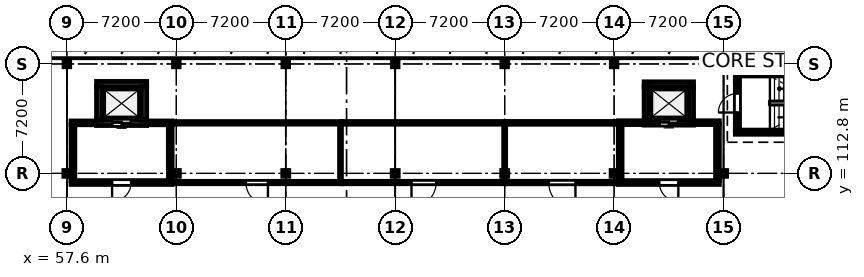
"""IFC4 building model, lengths in metres.
Left out: names, types, materials, properties, quantities, classifications, styles, units other than length and angle.
Written with IfcOpenShell. Run it as: python <this file> out.ifc"""

import sys

from ifc_helpers import new_model, si_unit, direction, frame, frame_2d, origin, origin_2d, place, context, subcontext, project, spatial, rectangle, i_section, extrude, element, fill, save


model = new_model("IFC4")
c1 = context("Model", 3, precision=1e-05, world=origin(), true_north=direction((0.0, 1.0)))
c2 = subcontext(c1, "Body", "Model", "MODEL_VIEW")
j1 = project(units=[si_unit("LENGTHUNIT", "METRE"), si_unit("PLANEANGLEUNIT", "RADIAN")], contexts=[c1])
p1 = place(None, origin())
s1 = spatial("IfcSite", under=j1, at=p1, CompositionType="ELEMENT")
p2 = place(p1, origin())
s2 = spatial("IfcBuilding", under=s1, at=p2, CompositionType="ELEMENT")
p3 = place(p2, frame((0.0, 0.0, 9.3)))
s3 = spatial("IfcBuildingStorey", under=s2, at=p3, CompositionType="ELEMENT", Elevation=9.3)
p4 = place(p3, frame((57.6, 112.8, 0.0), z_axis=(0.0, 0.0, 1.0), x_axis=(1.0, 0.0, 0.0)))
e1 = element("IfcColumn", 1, at=p4, inside=s3, PredefinedType="COLUMN", context=c2, shape_type="SweptSolid", body=[
    extrude(i_section(OverallWidth=0.396, OverallDepth=0.381, WebThickness=0.019, FlangeThickness=0.03, FilletRadius=0.015, at=origin_2d()), origin(), (0.0, 0.0, 1.0), 3.9),
])
p5 = place(p3, frame((57.6, 120.0, 0.0), z_axis=(0.0, 0.0, 1.0), x_axis=(1.0, 0.0, 0.0)))
e2 = element("IfcColumn", 2, at=p5, inside=s3, PredefinedType="COLUMN", context=c2, shape_type="SweptSolid", body=[
    extrude(i_section(OverallWidth=0.373, OverallDepth=0.373, WebThickness=0.016, FlangeThickness=0.026, FilletRadius=0.015, at=origin_2d()), origin(), (0.0, 0.0, 1.0), 3.9),
])
p6 = place(p3, frame((64.8, 112.8, 0.0), z_axis=(0.0, 0.0, 1.0), x_axis=(1.0, 0.0, 0.0)))
e3 = element("IfcColumn", 3, at=p6, inside=s3, PredefinedType="COLUMN", context=c2, shape_type="SweptSolid", body=[
    extrude(i_section(OverallWidth=0.396, OverallDepth=0.381, WebThickness=0.019, FlangeThickness=0.03, FilletRadius=0.015, at=origin_2d()), origin(), (0.0, 0.0, 1.0), 3.9),
])
p7 = place(p3, frame((64.8, 120.0, 0.0), z_axis=(0.0, 0.0, 1.0), x_axis=(1.0, 0.0, 0.0)))
e4 = element("IfcColumn", 4, at=p7, inside=s3, PredefinedType="COLUMN", context=c2, shape_type="SweptSolid", body=[
    extrude(i_section(OverallWidth=0.373, OverallDepth=0.373, WebThickness=0.016, FlangeThickness=0.026, FilletRadius=0.015, at=origin_2d()), origin(), (0.0, 0.0, 1.0), 3.9),
])
p8 = place(p3, frame((72.0, 112.8, 0.0), z_axis=(0.0, 0.0, 1.0), x_axis=(1.0, 0.0, 0.0)))
e5 = element("IfcColumn", 5, at=p8, inside=s3, PredefinedType="COLUMN", context=c2, shape_type="SweptSolid", body=[
    extrude(i_section(OverallWidth=0.396, OverallDepth=0.381, WebThickness=0.019, FlangeThickness=0.03, FilletRadius=0.015, at=origin_2d()), origin(), (0.0, 0.0, 1.0), 3.9),
])
p9 = place(p3, frame((72.0, 120.0, 0.0), z_axis=(0.0, 0.0, 1.0), x_axis=(1.0, 0.0, 0.0)))
e6 = element("IfcColumn", 6, at=p9, inside=s3, PredefinedType="COLUMN", context=c2, shape_type="SweptSolid", body=[
    extrude(i_section(OverallWidth=0.373, OverallDepth=0.373, WebThickness=0.016, FlangeThickness=0.026, FilletRadius=0.015, at=origin_2d()), origin(), (0.0, 0.0, 1.0), 3.9),
])
p10 = place(p3, frame((79.2, 112.8, 0.0), z_axis=(0.0, 0.0, 1.0), x_axis=(1.0, 0.0, 0.0)))
e7 = element("IfcColumn", 7, at=p10, inside=s3, PredefinedType="COLUMN", context=c2, shape_type="SweptSolid", body=[
    extrude(i_section(OverallWidth=0.396, OverallDepth=0.381, WebThickness=0.019, FlangeThickness=0.03, FilletRadius=0.015, at=origin_2d()), origin(), (0.0, 0.0, 1.0), 3.9),
])
p11 = place(p3, frame((79.2, 120.0, 0.0), z_axis=(0.0, 0.0, 1.0), x_axis=(1.0, 0.0, 0.0)))
e8 = element("IfcColumn", 8, at=p11, inside=s3, PredefinedType="COLUMN", context=c2, shape_type="SweptSolid", body=[
    extrude(i_section(OverallWidth=0.373, OverallDepth=0.373, WebThickness=0.016, FlangeThickness=0.026, FilletRadius=0.015, at=origin_2d()), origin(), (0.0, 0.0, 1.0), 3.9),
])
p12 = place(p3, frame((86.4, 112.8, 0.0), z_axis=(0.0, 0.0, 1.0), x_axis=(1.0, 0.0, 0.0)))
e9 = element("IfcColumn", 9, at=p12, inside=s3, PredefinedType="COLUMN", context=c2, shape_type="SweptSolid", body=[
    extrude(i_section(OverallWidth=0.396, OverallDepth=0.381, WebThickness=0.019, FlangeThickness=0.03, FilletRadius=0.015, at=origin_2d()), origin(), (0.0, 0.0, 1.0), 3.9),
])
p13 = place(p3, frame((86.4, 120.0, 0.0), z_axis=(0.0, 0.0, 1.0), x_axis=(1.0, 0.0, 0.0)))
e10 = element("IfcColumn", 10, at=p13, inside=s3, PredefinedType="COLUMN", context=c2, shape_type="SweptSolid", body=[
    extrude(i_section(OverallWidth=0.373, OverallDepth=0.373, WebThickness=0.016, FlangeThickness=0.026, FilletRadius=0.015, at=origin_2d()), origin(), (0.0, 0.0, 1.0), 3.9),
])
p14 = place(p3, frame((93.6, 112.8, 0.0), z_axis=(0.0, 0.0, 1.0), x_axis=(1.0, 0.0, 0.0)))
e11 = element("IfcColumn", 11, at=p14, inside=s3, PredefinedType="COLUMN", context=c2, shape_type="SweptSolid", body=[
    extrude(i_section(OverallWidth=0.396, OverallDepth=0.381, WebThickness=0.019, FlangeThickness=0.03, FilletRadius=0.015, at=origin_2d()), origin(), (0.0, 0.0, 1.0), 3.9),
])
p15 = place(p3, frame((93.6, 120.0, 0.0), z_axis=(0.0, 0.0, 1.0), x_axis=(1.0, 0.0, 0.0)))
e12 = element("IfcColumn", 12, at=p15, inside=s3, PredefinedType="COLUMN", context=c2, shape_type="SweptSolid", body=[
    extrude(i_section(OverallWidth=0.373, OverallDepth=0.373, WebThickness=0.016, FlangeThickness=0.026, FilletRadius=0.015, at=origin_2d()), origin(), (0.0, 0.0, 1.0), 3.9),
])
p16 = place(p3, frame((100.8, 112.8, 0.0), z_axis=(0.0, 0.0, 1.0), x_axis=(1.0, 0.0, 0.0)))
e13 = element("IfcColumn", 13, at=p16, inside=s3, PredefinedType="COLUMN", context=c2, shape_type="SweptSolid", body=[
    extrude(i_section(OverallWidth=0.396, OverallDepth=0.381, WebThickness=0.019, FlangeThickness=0.03, FilletRadius=0.015, at=origin_2d()), origin(), (0.0, 0.0, 1.0), 3.9),
])
p17 = place(p3, frame((100.8, 120.0, 0.0), z_axis=(0.0, 0.0, 1.0), x_axis=(1.0, 0.0, 0.0)))
e14 = element("IfcColumn", 14, at=p17, inside=s3, PredefinedType="COLUMN", context=c2, shape_type="SweptSolid", body=[
    extrude(i_section(OverallWidth=0.373, OverallDepth=0.373, WebThickness=0.016, FlangeThickness=0.026, FilletRadius=0.015, at=origin_2d()), origin(), (0.0, 0.0, 1.0), 3.9),
])
for number, where, z_axis, x_axis in (
    (15, (110.475, 115.512, 0.0), (0.0, 0.0, 1.0), (-1.0, 0.0, 0.0)),
    (16, (101.575, 119.348, 0.0), (0.0, 0.0, 1.0), (1.0, 0.0, 0.0)),
):
    element("IfcWall", number, at=place(p3, frame(where, z_axis=z_axis, x_axis=x_axis)), inside=s3, PredefinedType="SOLIDWALL", context=c2, shape_type="SweptSolid", body=[
        extrude(rectangle(XDim=8.9, YDim=0.275, at=frame_2d((4.45, 0.0))), origin(), (0.0, 0.0, 1.0), 3.69),
    ])
p18 = place(p3, frame((101.712, 115.65, 0.0), z_axis=(0.0, 0.0, 1.0), x_axis=(0.0, 1.0, 0.0)))
e17 = element("IfcWall", 17, at=p18, inside=s3, PredefinedType="SOLIDWALL", context=c2, shape_type="SweptSolid", body=[
    extrude(rectangle(XDim=3.56, YDim=0.275, at=frame_2d((1.78, 0.0))), origin(), (0.0, 0.0, 1.0), 3.69),
])
p19 = place(p18, frame((1.155, 0.0, 0.0)))
e18 = element("IfcOpeningElement", 18, at=p19, cuts=e17, PredefinedType="OPENING", context=c2, shape_type="SweptSolid", body=[
    extrude(rectangle(XDim=1.25, YDim=2.2, at=frame_2d((0.625, 1.1))), frame((0.0, 0.147, 0.0), z_axis=(0.0, -1.0, 0.0), x_axis=(1.0, 0.0, 0.0)), (0.0, 0.0, 1.0), 0.295),
])
p20 = place(p3, frame((62.85, 116.125, 0.0), z_axis=(0.0, 0.0, 1.0), x_axis=(-1.0, 0.0, 0.0)))
e19 = element("IfcWall", 19, at=p20, inside=s3, PredefinedType="SHEAR", context=c2, shape_type="SweptSolid", body=[
    extrude(rectangle(XDim=3.3, YDim=0.35, at=frame_2d((1.65, 0.0))), origin(), (0.0, 0.0, 1.0), 3.69),
])
p21 = place(p20, frame((1.05, 0.0, 0.0)))
e20 = element("IfcOpeningElement", 20, at=p21, cuts=e19, PredefinedType="OPENING", context=c2, shape_type="SweptSolid", body=[
    extrude(rectangle(XDim=1.2, YDim=2.2, at=frame_2d((0.6, 1.1))), frame((0.0, 0.185, 0.0), z_axis=(0.0, -1.0, 0.0), x_axis=(1.0, 0.0, 0.0)), (0.0, 0.0, 1.0), 0.37),
])
p22 = place(p3, frame((59.55, 118.675, 0.0), z_axis=(0.0, 0.0, 1.0), x_axis=(1.0, 0.0, 0.0)))
e21 = element("IfcWall", 21, at=p22, inside=s3, PredefinedType="SHEAR", context=c2, shape_type="SweptSolid", body=[
    extrude(rectangle(XDim=3.3, YDim=0.35, at=frame_2d((1.65, 0.0))), origin(), (0.0, 0.0, 1.0), 3.69),
])
for number, where, z_axis, x_axis in (
    (22, (59.725, 116.3, 0.0), (0.0, 0.0, 1.0), (0.0, 1.0, 0.0)),
    (23, (62.675, 118.5, 0.0), (0.0, 0.0, 1.0), (0.0, -1.0, 0.0)),
):
    element("IfcWall", number, at=place(p3, frame(where, z_axis=z_axis, x_axis=x_axis)), inside=s3, PredefinedType="SHEAR", context=c2, shape_type="SweptSolid", body=[
        extrude(rectangle(XDim=2.2, YDim=0.35, at=frame_2d((1.1, 0.0))), origin(), (0.0, 0.0, 1.0), 3.69),
    ])
p23 = place(p3, frame((98.825, 116.138, 0.0), z_axis=(0.0, 0.0, 1.0), x_axis=(-1.0, 0.0, 0.0)))
e24 = element("IfcWall", 24, at=p23, inside=s3, PredefinedType="SHEAR", context=c2, shape_type="SweptSolid", body=[
    extrude(rectangle(XDim=3.25, YDim=0.325, at=frame_2d((1.625, 0.0))), origin(), (0.0, 0.0, 1.0), 3.69),
])
p24 = place(p23, frame((1.025, 0.0, 0.0)))
e25 = element("IfcOpeningElement", 25, at=p24, cuts=e24, PredefinedType="OPENING", context=c2, shape_type="SweptSolid", body=[
    extrude(rectangle(XDim=1.2, YDim=2.2, at=frame_2d((0.6, 1.1))), frame((0.0, 0.172, 0.0), z_axis=(0.0, -1.0, 0.0), x_axis=(1.0, 0.0, 0.0)), (0.0, 0.0, 1.0), 0.345),
])
p25 = place(p3, frame((95.575, 118.662, 0.0), z_axis=(0.0, 0.0, 1.0), x_axis=(1.0, 0.0, 0.0)))
e26 = element("IfcWall", 26, at=p25, inside=s3, PredefinedType="SHEAR", context=c2, shape_type="SweptSolid", body=[
    extrude(rectangle(XDim=3.25, YDim=0.325, at=frame_2d((1.625, 0.0))), origin(), (0.0, 0.0, 1.0), 3.69),
])
for number, where, z_axis, x_axis in (
    (27, (95.738, 116.3, 0.0), (0.0, 0.0, 1.0), (0.0, 1.0, 0.0)),
    (28, (98.662, 118.5, 0.0), (0.0, 0.0, 1.0), (0.0, -1.0, 0.0)),
):
    element("IfcWall", number, at=place(p3, frame(where, z_axis=z_axis, x_axis=x_axis)), inside=s3, PredefinedType="SHEAR", context=c2, shape_type="SweptSolid", body=[
        extrude(rectangle(XDim=2.2, YDim=0.325, at=frame_2d((1.1, 0.0))), origin(), (0.0, 0.0, 1.0), 3.69),
    ])
p26 = place(p3, frame((64.525, 112.2, 0.0), z_axis=(0.0, 0.0, 1.0), x_axis=(-1.0, 0.0, 0.0)))
e29 = element("IfcWall", 29, at=p26, inside=s3, PredefinedType="PARTITIONING", context=c2, shape_type="SweptSolid", body=[
    extrude(rectangle(XDim=6.65, YDim=0.25, at=frame_2d((3.325, 0.0))), origin(), (0.0, 0.0, 1.0), 3.058),
])
p27 = place(p26, frame((2.7, 0.0, 0.0)))
e30 = element("IfcOpeningElement", 30, at=p27, cuts=e29, PredefinedType="OPENING", context=c2, shape_type="SweptSolid", body=[
    extrude(rectangle(XDim=1.25, YDim=2.2, at=frame_2d((0.625, 1.1))), frame((0.0, 0.135, 0.0), z_axis=(0.0, -1.0, 0.0), x_axis=(1.0, 0.0, 0.0)), (0.0, 0.0, 1.0), 0.27),
])
p28 = place(p3, frame((57.875, 116.125, 0.0), z_axis=(0.0, 0.0, 1.0), x_axis=(1.0, 0.0, 0.0)))
e31 = element("IfcWall", 31, at=p28, inside=s3, PredefinedType="PARTITIONING", context=c2, shape_type="SweptSolid", body=[
    extrude(rectangle(XDim=1.673, YDim=0.25, at=frame_2d((0.836, 0.0))), origin(), (0.0, 0.0, 1.0), 3.058),
])
p29 = place(p3, frame((62.852, 116.125, 0.0), z_axis=(0.0, 0.0, 1.0), x_axis=(1.0, 0.0, 0.0)))
e32 = element("IfcWall", 32, at=p29, inside=s3, PredefinedType="PARTITIONING", context=c2, shape_type="SweptSolid", body=[
    extrude(rectangle(XDim=1.673, YDim=0.25, at=frame_2d((0.836, 0.0))), origin(), (0.0, 0.0, 1.0), 3.058),
])
for number, where, z_axis, x_axis in (
    (33, (58.0, 112.327, 0.0), (0.0, 0.0, 1.0), (0.0, 1.0, 0.0)),
    (34, (64.4, 115.998, 0.0), (0.0, 0.0, 1.0), (0.0, -1.0, 0.0)),
):
    element("IfcWall", number, at=place(p3, frame(where, z_axis=z_axis, x_axis=x_axis)), inside=s3, PredefinedType="PARTITIONING", context=c2, shape_type="SweptSolid", body=[
        extrude(rectangle(XDim=3.671, YDim=0.25, at=frame_2d((1.835, 0.0))), origin(), (0.0, 0.0, 1.0), 3.058),
    ])
p30 = place(p3, frame((100.525, 112.2, 0.0), z_axis=(0.0, 0.0, 1.0), x_axis=(-1.0, 0.0, 0.0)))
e35 = element("IfcWall", 35, at=p30, inside=s3, PredefinedType="PARTITIONING", context=c2, shape_type="SweptSolid", body=[
    extrude(rectangle(XDim=6.65, YDim=0.25, at=frame_2d((3.325, 0.0))), origin(), (0.0, 0.0, 1.0), 3.058),
])
p31 = place(p30, frame((2.7, 0.0, 0.0)))
e36 = element("IfcOpeningElement", 36, at=p31, cuts=e35, PredefinedType="OPENING", context=c2, shape_type="SweptSolid", body=[
    extrude(rectangle(XDim=1.25, YDim=2.2, at=frame_2d((0.625, 1.1))), frame((0.0, 0.135, 0.0), z_axis=(0.0, -1.0, 0.0), x_axis=(1.0, 0.0, 0.0)), (0.0, 0.0, 1.0), 0.27),
])
for number, where, z_axis, x_axis in (
    (37, (93.875, 116.138, 0.0), (0.0, 0.0, 1.0), (1.0, 0.0, 0.0)),
    (38, (98.827, 116.138, 0.0), (0.0, 0.0, 1.0), (1.0, 0.0, 0.0)),
):
    element("IfcWall", number, at=place(p3, frame(where, z_axis=z_axis, x_axis=x_axis)), inside=s3, PredefinedType="PARTITIONING", context=c2, shape_type="SweptSolid", body=[
        extrude(rectangle(XDim=1.698, YDim=0.25, at=frame_2d((0.849, 0.0))), origin(), (0.0, 0.0, 1.0), 3.058),
    ])
for number, where, z_axis, x_axis in (
    (39, (94.0, 112.327, 0.0), (0.0, 0.0, 1.0), (0.0, 1.0, 0.0)),
    (40, (100.4, 116.011, 0.0), (0.0, 0.0, 1.0), (0.0, -1.0, 0.0)),
):
    element("IfcWall", number, at=place(p3, frame(where, z_axis=z_axis, x_axis=x_axis)), inside=s3, PredefinedType="PARTITIONING", context=c2, shape_type="SweptSolid", body=[
        extrude(rectangle(XDim=3.684, YDim=0.25, at=frame_2d((1.842, 0.0))), origin(), (0.0, 0.0, 1.0), 3.058),
    ])
p32 = place(p3, frame((75.68, 112.2, 0.0), z_axis=(0.0, 0.0, 1.0), x_axis=(-1.0, 0.0, 0.0)))
e41 = element("IfcWall", 41, at=p32, inside=s3, PredefinedType="PARTITIONING", context=c2, shape_type="SweptSolid", body=[
    extrude(rectangle(XDim=11.153, YDim=0.155, at=frame_2d((5.576, 0.0))), origin(), (0.0, 0.0, 1.0), 3.058),
])
p33 = place(p32, frame((4.852, 0.0, 0.0)))
e42 = element("IfcOpeningElement", 42, at=p33, cuts=e41, PredefinedType="OPENING", context=c2, shape_type="SweptSolid", body=[
    extrude(rectangle(XDim=1.45, YDim=2.34, at=frame_2d((0.725, 1.17))), frame((0.0, 0.087, 0.0), z_axis=(0.0, -1.0, 0.0), x_axis=(1.0, 0.0, 0.0)), (0.0, 0.0, 1.0), 0.175),
])
p34 = place(p3, frame((86.48, 112.2, 0.0), z_axis=(0.0, 0.0, 1.0), x_axis=(-1.0, 0.0, 0.0)))
e43 = element("IfcWall", 43, at=p34, inside=s3, PredefinedType="PARTITIONING", context=c2, shape_type="SweptSolid", body=[
    extrude(rectangle(XDim=10.798, YDim=0.16, at=frame_2d((5.399, 0.0))), origin(), (0.0, 0.0, 1.0), 3.058),
])
p35 = place(p34, frame((4.589, 0.0, 0.0)))
e44 = element("IfcOpeningElement", 44, at=p35, cuts=e43, PredefinedType="OPENING", context=c2, shape_type="SweptSolid", body=[
    extrude(rectangle(XDim=1.62, YDim=2.34, at=frame_2d((0.81, 1.17))), frame((0.0, 0.09, 0.0), z_axis=(0.0, -1.0, 0.0), x_axis=(1.0, 0.0, 0.0)), (0.0, 0.0, 1.0), 0.18),
])
p36 = place(p34, frame((2.339, 0.0, 0.95)))
e45 = element("IfcOpeningElement", 45, at=p36, cuts=e43, PredefinedType="OPENING", context=c2, shape_type="SweptSolid", body=[
    extrude(rectangle(XDim=1.0, YDim=1.0, at=frame_2d((0.5, 0.5))), frame((0.0, 0.09, 0.0), z_axis=(0.0, -1.0, 0.0), x_axis=(1.0, 0.0, 0.0)), (0.0, 0.0, 1.0), 0.18),
])
p37 = place(p3, frame((93.873, 112.2, 0.0), z_axis=(0.0, 0.0, 1.0), x_axis=(-1.0, 0.0, 0.0)))
e46 = element("IfcWall", 46, at=p37, inside=s3, PredefinedType="PARTITIONING", context=c2, shape_type="SweptSolid", body=[
    extrude(rectangle(XDim=7.391, YDim=0.165, at=frame_2d((3.696, 0.0))), origin(), (0.0, 0.0, 1.0), 3.058),
])
p38 = place(p37, frame((2.816, 0.0, 0.0)))
e47 = element("IfcOpeningElement", 47, at=p38, cuts=e46, PredefinedType="OPENING", context=c2, shape_type="SweptSolid", body=[
    extrude(rectangle(XDim=1.76, YDim=2.34, at=frame_2d((0.88, 1.17))), frame((0.0, 0.093, 0.0), z_axis=(0.0, -1.0, 0.0), x_axis=(1.0, 0.0, 0.0)), (0.0, 0.0, 1.0), 0.185),
])
p39 = place(p3, frame((64.527, 116.125, 0.0), z_axis=(0.0, 0.0, 1.0), x_axis=(1.0, 0.0, 0.0)))
e48 = element("IfcWall", 48, at=p39, inside=s3, PredefinedType="PARTITIONING", context=c2, shape_type="SweptSolid", body=[
    extrude(rectangle(XDim=11.153, YDim=0.17, at=frame_2d((5.576, 0.0))), origin(), (0.0, 0.0, 1.0), 3.058),
])
p40 = place(p3, frame((75.682, 116.125, 0.0), z_axis=(0.0, 0.0, 1.0), x_axis=(1.0, 0.0, 0.0)))
e49 = element("IfcWall", 49, at=p40, inside=s3, PredefinedType="PARTITIONING", context=c2, shape_type="SweptSolid", body=[
    extrude(rectangle(XDim=10.798, YDim=0.178, at=frame_2d((5.399, 0.0))), origin(), (0.0, 0.0, 1.0), 3.058),
])
p41 = place(p3, frame((86.482, 116.125, 0.0), z_axis=(0.0, 0.0, 1.0), x_axis=(1.0, 0.0, 0.0)))
e50 = element("IfcWall", 50, at=p41, inside=s3, PredefinedType="PARTITIONING", context=c2, shape_type="SweptSolid", body=[
    extrude(rectangle(XDim=7.391, YDim=0.185, at=frame_2d((3.696, 0.0))), origin(), (0.0, 0.0, 1.0), 3.058),
])
p42 = place(p3, frame((75.6, 116.034, 0.0), z_axis=(0.0, 0.0, 1.0), x_axis=(0.0, -1.0, 0.0)))
e51 = element("IfcWall", 51, at=p42, inside=s3, PredefinedType="PARTITIONING", context=c2, shape_type="SweptSolid", body=[
    extrude(rectangle(XDim=3.752, YDim=0.125, at=frame_2d((1.876, 0.0))), origin(), (0.0, 0.0, 1.0), 3.058),
])
p43 = place(p3, frame((86.4, 116.03, 0.0), z_axis=(0.0, 0.0, 1.0), x_axis=(0.0, -1.0, 0.0)))
e52 = element("IfcWall", 52, at=p43, inside=s3, PredefinedType="PARTITIONING", context=c2, shape_type="SweptSolid", body=[
    extrude(rectangle(XDim=3.745, YDim=0.13, at=frame_2d((1.873, 0.0))), origin(), (0.0, 0.0, 1.0), 3.058),
])
p44 = place(p19, origin())
e53 = element("IfcDoor", 53, at=p44, inside=s3, OperationType="SINGLE_SWING_LEFT", PredefinedType="DOOR", context=c2, shape_type="SweptSolid", body=[
    extrude(rectangle(XDim=1.25, YDim=2.2, at=frame_2d((0.625, 1.1))), frame((0.0, 0.025, 0.0), z_axis=(0.0, -1.0, 0.0), x_axis=(1.0, 0.0, 0.0)), (0.0, 0.0, 1.0), 0.05),
])
fill(e18, e53)
p45 = place(p21, origin())
e54 = element("IfcDoor", 54, at=p45, inside=s3, OperationType="DOUBLE_DOOR_SLIDING", PredefinedType="DOOR", context=c2, shape_type="SweptSolid", body=[
    extrude(rectangle(XDim=1.2, YDim=2.2, at=frame_2d((0.6, 1.1))), frame((0.0, 0.025, 0.0), z_axis=(0.0, -1.0, 0.0), x_axis=(1.0, 0.0, 0.0)), (0.0, 0.0, 1.0), 0.05),
])
fill(e20, e54)
p46 = place(p24, origin())
e55 = element("IfcDoor", 55, at=p46, inside=s3, OperationType="DOUBLE_DOOR_SLIDING", PredefinedType="DOOR", context=c2, shape_type="SweptSolid", body=[
    extrude(rectangle(XDim=1.2, YDim=2.2, at=frame_2d((0.6, 1.1))), frame((0.0, 0.025, 0.0), z_axis=(0.0, -1.0, 0.0), x_axis=(1.0, 0.0, 0.0)), (0.0, 0.0, 1.0), 0.05),
])
fill(e25, e55)
p47 = place(p27, origin())
e56 = element("IfcDoor", 56, at=p47, inside=s3, OperationType="SINGLE_SWING_RIGHT", PredefinedType="DOOR", context=c2, shape_type="SweptSolid", body=[
    extrude(rectangle(XDim=1.25, YDim=2.2, at=frame_2d((0.625, 1.1))), frame((0.0, 0.025, 0.0), z_axis=(0.0, -1.0, 0.0), x_axis=(1.0, 0.0, 0.0)), (0.0, 0.0, 1.0), 0.05),
])
fill(e30, e56)
p48 = place(p31, origin())
e57 = element("IfcDoor", 57, at=p48, inside=s3, OperationType="SINGLE_SWING_LEFT", PredefinedType="DOOR", context=c2, shape_type="SweptSolid", body=[
    extrude(rectangle(XDim=1.25, YDim=2.2, at=frame_2d((0.625, 1.1))), frame((0.0, 0.025, 0.0), z_axis=(0.0, -1.0, 0.0), x_axis=(1.0, 0.0, 0.0)), (0.0, 0.0, 1.0), 0.05),
])
fill(e36, e57)
p49 = place(p33, origin())
e58 = element("IfcDoor", 58, at=p49, inside=s3, OperationType="SINGLE_SWING_LEFT", PredefinedType="DOOR", context=c2, shape_type="SweptSolid", body=[
    extrude(rectangle(XDim=1.45, YDim=2.34, at=frame_2d((0.725, 1.17))), frame((0.0, 0.025, 0.0), z_axis=(0.0, -1.0, 0.0), x_axis=(1.0, 0.0, 0.0)), (0.0, 0.0, 1.0), 0.05),
])
fill(e42, e58)
p50 = place(p35, origin())
e59 = element("IfcDoor", 59, at=p50, inside=s3, OperationType="SINGLE_SWING_RIGHT", PredefinedType="DOOR", context=c2, shape_type="SweptSolid", body=[
    extrude(rectangle(XDim=1.62, YDim=2.34, at=frame_2d((0.81, 1.17))), frame((0.0, 0.025, 0.0), z_axis=(0.0, -1.0, 0.0), x_axis=(1.0, 0.0, 0.0)), (0.0, 0.0, 1.0), 0.05),
])
fill(e44, e59)
p51 = place(p36, origin())
e60 = element("IfcWindow", 60, at=p51, inside=s3, PartitioningType="SINGLE_PANEL", PredefinedType="WINDOW", context=c2, shape_type="SweptSolid", body=[
    extrude(rectangle(XDim=1.0, YDim=1.0, at=frame_2d((0.5, 0.5))), frame((0.0, 0.03, 0.0), z_axis=(0.0, -1.0, 0.0), x_axis=(1.0, 0.0, 0.0)), (0.0, 0.0, 1.0), 0.06),
])
fill(e45, e60)
p52 = place(p38, origin())
e61 = element("IfcDoor", 61, at=p52, inside=s3, OperationType="SINGLE_SWING_LEFT", PredefinedType="DOOR", context=c2, shape_type="SweptSolid", body=[
    extrude(rectangle(XDim=1.76, YDim=2.34, at=frame_2d((0.88, 1.17))), frame((0.0, 0.025, 0.0), z_axis=(0.0, -1.0, 0.0), x_axis=(1.0, 0.0, 0.0)), (0.0, 0.0, 1.0), 0.05),
])
fill(e47, e61)
save(model, sys.argv[1])
